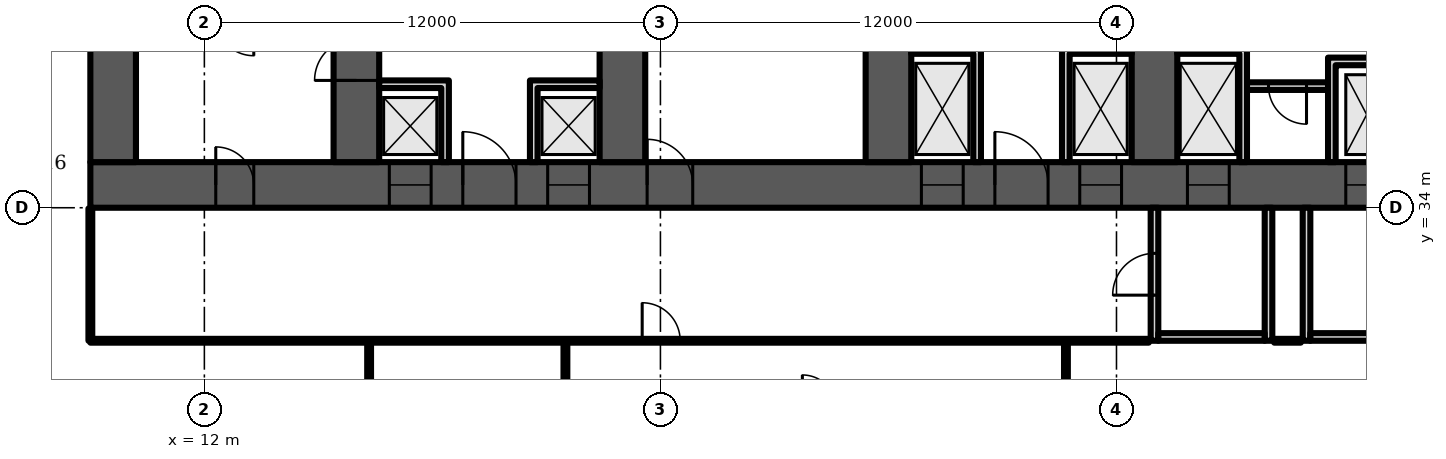
"""IFC4 building model, lengths in metres.
Left out: names, types, materials, properties, quantities, classifications, styles, units other than length and angle.
Written with IfcOpenShell. Run it as: python <this file> out.ifc"""

import sys

from ifc_helpers import new_model, si_unit, direction, frame, frame_2d, origin, place, context, subcontext, project, spatial, polyline, rectangle, outline, extrude, element, fill, save


model = new_model("IFC4")
c1 = context("Model", 3, precision=1e-05, world=origin(), true_north=direction((0.0, 1.0)))
c2 = subcontext(c1, "Body", "Model", "MODEL_VIEW")
j1 = project(units=[si_unit("LENGTHUNIT", "METRE"), si_unit("PLANEANGLEUNIT", "RADIAN")], contexts=[c1])
p1 = place(None, origin())
s1 = spatial("IfcSite", under=j1, at=p1, CompositionType="ELEMENT")
p2 = place(p1, origin())
s2 = spatial("IfcBuilding", under=s1, at=p2, CompositionType="ELEMENT")
p3 = place(p2, frame((0.0, 0.0, 84.7)))
s3 = spatial("IfcBuildingStorey", under=s2, at=p3, CompositionType="ELEMENT", Elevation=84.7)
p4 = place(p3, frame((9.0, 34.6, 0.0), z_axis=(0.0, 0.0, 1.0), x_axis=(1.0, 0.0, 0.0)))
e1 = element("IfcWall", 1, at=p4, inside=s3, PredefinedType="SHEAR", context=c2, shape_type="SweptSolid", body=[
    extrude(rectangle(XDim=56.0, YDim=1.2, at=frame_2d((28.0, 0.0))), origin(), (0.0, 0.0, 1.0), 3.6),
])
p5 = place(p4, frame((3.3, 0.0, 0.0)))
e2 = element("IfcOpeningElement", 2, at=p5, cuts=e1, PredefinedType="OPENING", context=c2, shape_type="SweptSolid", body=[
    extrude(rectangle(XDim=1.0, YDim=2.1, at=frame_2d((0.5, 1.05))), frame((0.0, 0.61, 0.0), z_axis=(0.0, -1.0, 0.0), x_axis=(1.0, 0.0, 0.0)), (0.0, 0.0, 1.0), 1.22),
])
p6 = place(p4, frame((7.867, 0.0, 0.0)))
e3 = element("IfcOpeningElement", 3, at=p6, cuts=e1, PredefinedType="OPENING", context=c2, shape_type="SweptSolid", body=[
    extrude(rectangle(XDim=1.1, YDim=2.1, at=frame_2d((0.55, 1.05))), frame((0.0, 0.61, 0.0), z_axis=(0.0, -1.0, 0.0), x_axis=(1.0, 0.0, 0.0)), (0.0, 0.0, 1.0), 1.22),
])
p7 = place(p4, frame((12.033, 0.0, 0.0)))
e4 = element("IfcOpeningElement", 4, at=p7, cuts=e1, PredefinedType="OPENING", context=c2, shape_type="SweptSolid", body=[
    extrude(rectangle(XDim=1.1, YDim=2.1, at=frame_2d((0.55, 1.05))), frame((0.0, 0.61, 0.0), z_axis=(0.0, -1.0, 0.0), x_axis=(1.0, 0.0, 0.0)), (0.0, 0.0, 1.0), 1.22),
])
p8 = place(p4, frame((9.8, 0.0, 0.0)))
e5 = element("IfcOpeningElement", 5, at=p8, cuts=e1, PredefinedType="OPENING", context=c2, shape_type="SweptSolid", body=[
    extrude(rectangle(XDim=1.4, YDim=2.1, at=frame_2d((0.7, 1.05))), frame((0.0, 0.61, 0.0), z_axis=(0.0, -1.0, 0.0), x_axis=(1.0, 0.0, 0.0)), (0.0, 0.0, 1.0), 1.22),
])
p9 = place(p4, frame((14.65, 0.0, 0.0)))
e6 = element("IfcOpeningElement", 6, at=p9, cuts=e1, PredefinedType="OPENING", context=c2, shape_type="SweptSolid", body=[
    extrude(rectangle(XDim=1.2, YDim=2.1, at=frame_2d((0.6, 1.05))), frame((0.0, 0.61, 0.0), z_axis=(0.0, -1.0, 0.0), x_axis=(1.0, 0.0, 0.0)), (0.0, 0.0, 1.0), 1.22),
])
p10 = place(p4, frame((21.867, 0.0, 0.0)))
e7 = element("IfcOpeningElement", 7, at=p10, cuts=e1, PredefinedType="OPENING", context=c2, shape_type="SweptSolid", body=[
    extrude(rectangle(XDim=1.1, YDim=2.1, at=frame_2d((0.55, 1.05))), frame((0.0, 0.61, 0.0), z_axis=(0.0, -1.0, 0.0), x_axis=(1.0, 0.0, 0.0)), (0.0, 0.0, 1.0), 1.22),
])
p11 = place(p4, frame((26.033, 0.0, 0.0)))
e8 = element("IfcOpeningElement", 8, at=p11, cuts=e1, PredefinedType="OPENING", context=c2, shape_type="SweptSolid", body=[
    extrude(rectangle(XDim=1.1, YDim=2.1, at=frame_2d((0.55, 1.05))), frame((0.0, 0.61, 0.0), z_axis=(0.0, -1.0, 0.0), x_axis=(1.0, 0.0, 0.0)), (0.0, 0.0, 1.0), 1.22),
])
p12 = place(p4, frame((23.8, 0.0, 0.0)))
e9 = element("IfcOpeningElement", 9, at=p12, cuts=e1, PredefinedType="OPENING", context=c2, shape_type="SweptSolid", body=[
    extrude(rectangle(XDim=1.4, YDim=2.1, at=frame_2d((0.7, 1.05))), frame((0.0, 0.61, 0.0), z_axis=(0.0, -1.0, 0.0), x_axis=(1.0, 0.0, 0.0)), (0.0, 0.0, 1.0), 1.22),
])
p13 = place(p4, frame((28.867, 0.0, 0.0)))
e10 = element("IfcOpeningElement", 10, at=p13, cuts=e1, PredefinedType="OPENING", context=c2, shape_type="SweptSolid", body=[
    extrude(rectangle(XDim=1.1, YDim=2.1, at=frame_2d((0.55, 1.05))), frame((0.0, 0.61, 0.0), z_axis=(0.0, -1.0, 0.0), x_axis=(1.0, 0.0, 0.0)), (0.0, 0.0, 1.0), 1.22),
])
p14 = place(p4, frame((33.033, 0.0, 0.0)))
e11 = element("IfcOpeningElement", 11, at=p14, cuts=e1, PredefinedType="OPENING", context=c2, shape_type="SweptSolid", body=[
    extrude(rectangle(XDim=1.1, YDim=2.1, at=frame_2d((0.55, 1.05))), frame((0.0, 0.61, 0.0), z_axis=(0.0, -1.0, 0.0), x_axis=(1.0, 0.0, 0.0)), (0.0, 0.0, 1.0), 1.22),
])
p15 = place(p4, frame((40.15, 0.0, 0.0)))
e12 = element("IfcOpeningElement", 12, at=p15, cuts=e1, PredefinedType="OPENING", context=c2, shape_type="SweptSolid", body=[
    extrude(rectangle(XDim=1.2, YDim=2.1, at=frame_2d((0.6, 1.05))), frame((0.0, 0.61, 0.0), z_axis=(0.0, -1.0, 0.0), x_axis=(1.0, 0.0, 0.0)), (0.0, 0.0, 1.0), 1.22),
])
p16 = place(p4, frame((44.8, 0.0, 0.0)))
e13 = element("IfcOpeningElement", 13, at=p16, cuts=e1, PredefinedType="OPENING", context=c2, shape_type="SweptSolid", body=[
    extrude(rectangle(XDim=1.4, YDim=2.1, at=frame_2d((0.7, 1.05))), frame((0.0, 0.61, 0.0), z_axis=(0.0, -1.0, 0.0), x_axis=(1.0, 0.0, 0.0)), (0.0, 0.0, 1.0), 1.22),
])
p17 = place(p4, frame((49.867, 0.0, 0.0)))
e14 = element("IfcOpeningElement", 14, at=p17, cuts=e1, PredefinedType="OPENING", context=c2, shape_type="SweptSolid", body=[
    extrude(rectangle(XDim=1.1, YDim=2.1, at=frame_2d((0.55, 1.05))), frame((0.0, 0.61, 0.0), z_axis=(0.0, -1.0, 0.0), x_axis=(1.0, 0.0, 0.0)), (0.0, 0.0, 1.0), 1.22),
])
p18 = place(p4, frame((53.5, 0.0, 0.0)))
e15 = element("IfcOpeningElement", 15, at=p18, cuts=e1, PredefinedType="OPENING", context=c2, shape_type="SweptSolid", body=[
    extrude(rectangle(XDim=1.1, YDim=2.1, at=frame_2d((0.55, 1.05))), frame((0.0, 0.61, 0.0), z_axis=(0.0, -1.0, 0.0), x_axis=(1.0, 0.0, 0.0)), (0.0, 0.0, 1.0), 1.22),
])
p19 = place(p4, frame((51.567, 0.0, 0.0)))
e16 = element("IfcOpeningElement", 16, at=p19, cuts=e1, PredefinedType="OPENING", context=c2, shape_type="SweptSolid", body=[
    extrude(rectangle(XDim=1.4, YDim=2.1, at=frame_2d((0.7, 1.05))), frame((0.0, 0.61, 0.0), z_axis=(0.0, -1.0, 0.0), x_axis=(1.0, 0.0, 0.0)), (0.0, 0.0, 1.0), 1.22),
])
p20 = place(p3, frame((9.6, 35.2, 0.0), z_axis=(0.0, 0.0, 1.0), x_axis=(0.0, 1.0, 0.0)))
e17 = element("IfcWall", 17, at=p20, inside=s3, PredefinedType="SHEAR", context=c2, shape_type="SweptSolid", body=[
    extrude(rectangle(XDim=12.383, YDim=1.2, at=frame_2d((6.191, 0.0))), origin(), (0.0, 0.0, 1.0), 3.6),
])
p21 = place(p3, frame((16.0, 35.2, 0.0), z_axis=(0.0, 0.0, 1.0), x_axis=(0.0, 1.0, 0.0)))
e18 = element("IfcWall", 18, at=p21, inside=s3, PredefinedType="SHEAR", context=c2, shape_type="SweptSolid", body=[
    extrude(rectangle(XDim=12.943, YDim=1.2, at=frame_2d((6.471, 0.0))), origin(), (0.0, 0.0, 1.0), 3.6),
])
p22 = place(p21, frame((2.15, 0.0, 0.0)))
e19 = element("IfcOpeningElement", 19, at=p22, cuts=e18, PredefinedType="OPENING", context=c2, shape_type="SweptSolid", body=[
    extrude(rectangle(XDim=1.1, YDim=2.1, at=frame_2d((0.55, 1.05))), frame((0.0, 0.61, 0.0), z_axis=(0.0, -1.0, 0.0), x_axis=(1.0, 0.0, 0.0)), (0.0, 0.0, 1.0), 1.22),
])
p23 = place(p21, frame((9.6, 0.0, 0.0)))
e20 = element("IfcOpeningElement", 20, at=p23, cuts=e18, PredefinedType="OPENING", context=c2, shape_type="SweptSolid", body=[
    extrude(rectangle(XDim=1.0, YDim=2.1, at=frame_2d((0.5, 1.05))), frame((0.0, 0.61, 0.0), z_axis=(0.0, -1.0, 0.0), x_axis=(1.0, 0.0, 0.0)), (0.0, 0.0, 1.0), 1.22),
])
p24 = place(p3, frame((23.0, 35.2, 0.0), z_axis=(0.0, 0.0, 1.0), x_axis=(0.0, 1.0, 0.0)))
e21 = element("IfcWall", 21, at=p24, inside=s3, PredefinedType="SHEAR", context=c2, shape_type="SweptSolid", body=[
    extrude(rectangle(XDim=13.555, YDim=1.2, at=frame_2d((6.778, 0.0))), origin(), (0.0, 0.0, 1.0), 3.6),
])
p25 = place(p24, frame((10.414, 0.0, 0.0)))
e22 = element("IfcOpeningElement", 22, at=p25, cuts=e21, PredefinedType="OPENING", context=c2, shape_type="SweptSolid", body=[
    extrude(rectangle(XDim=1.0, YDim=2.1, at=frame_2d((0.5, 1.05))), frame((0.0, 0.61, 0.0), z_axis=(0.0, -1.0, 0.0), x_axis=(1.0, 0.0, 0.0)), (0.0, 0.0, 1.0), 1.22),
])
p26 = place(p24, frame((3.2, 0.0, 0.0)))
e23 = element("IfcOpeningElement", 23, at=p26, cuts=e21, PredefinedType="OPENING", context=c2, shape_type="SweptSolid", body=[
    extrude(rectangle(XDim=1.1, YDim=2.1, at=frame_2d((0.55, 1.05))), frame((0.0, 0.61, 0.0), z_axis=(0.0, -1.0, 0.0), x_axis=(1.0, 0.0, 0.0)), (0.0, 0.0, 1.0), 1.22),
])
p27 = place(p3, frame((30.0, 35.2, 0.0), z_axis=(0.0, 0.0, 1.0), x_axis=(0.0, 1.0, 0.0)))
e24 = element("IfcWall", 24, at=p27, inside=s3, PredefinedType="SHEAR", context=c2, shape_type="SweptSolid", body=[
    extrude(rectangle(XDim=14.168, YDim=1.2, at=frame_2d((7.084, 0.0))), origin(), (0.0, 0.0, 1.0), 3.6),
])
p28 = place(p27, frame((3.2, 0.0, 0.0)))
e25 = element("IfcOpeningElement", 25, at=p28, cuts=e24, PredefinedType="OPENING", context=c2, shape_type="SweptSolid", body=[
    extrude(rectangle(XDim=1.1, YDim=2.1, at=frame_2d((0.55, 1.05))), frame((0.0, 0.61, 0.0), z_axis=(0.0, -1.0, 0.0), x_axis=(1.0, 0.0, 0.0)), (0.0, 0.0, 1.0), 1.22),
])
p29 = place(p3, frame((37.0, 35.2, 0.0), z_axis=(0.0, 0.0, 1.0), x_axis=(0.0, 1.0, 0.0)))
e26 = element("IfcWall", 26, at=p29, inside=s3, PredefinedType="SHEAR", context=c2, shape_type="SweptSolid", body=[
    extrude(rectangle(XDim=14.78, YDim=1.2, at=frame_2d((7.39, 0.0))), origin(), (0.0, 0.0, 1.0), 3.6),
])
p30 = place(p29, frame((3.2, 0.0, 0.0)))
e27 = element("IfcOpeningElement", 27, at=p30, cuts=e26, PredefinedType="OPENING", context=c2, shape_type="SweptSolid", body=[
    extrude(rectangle(XDim=1.1, YDim=2.1, at=frame_2d((0.55, 1.05))), frame((0.0, 0.61, 0.0), z_axis=(0.0, -1.0, 0.0), x_axis=(1.0, 0.0, 0.0)), (0.0, 0.0, 1.0), 1.22),
])
p31 = place(p29, frame((9.6, 0.0, 0.0)))
e28 = element("IfcOpeningElement", 28, at=p31, cuts=e26, PredefinedType="OPENING", context=c2, shape_type="SweptSolid", body=[
    extrude(rectangle(XDim=1.0, YDim=2.1, at=frame_2d((0.5, 1.05))), frame((0.0, 0.61, 0.0), z_axis=(0.0, -1.0, 0.0), x_axis=(1.0, 0.0, 0.0)), (0.0, 0.0, 1.0), 1.22),
])
p32 = place(p3, frame((0.0, 0.0, -0.0)))
e29 = element("IfcWall", 29, at=p32, inside=s3, PredefinedType="PARTITIONING", context=c2, shape_type="SweptSolid", body=[
    extrude(outline(polyline([(18.233, 37.15), (16.6, 37.15), (16.6, 37.35), (18.233, 37.35), (18.433, 37.35), (18.433, 35.2), (18.233, 35.2), (18.233, 37.15)])), origin(), (0.0, 0.0, 1.0), 3.2),
])
p33 = place(p3, frame((0.0, 0.0, -0.0)))
e30 = element("IfcWall", 30, at=p33, inside=s3, PredefinedType="PARTITIONING", context=c2, shape_type="SweptSolid", body=[
    extrude(outline(polyline([(20.567, 37.35), (20.767, 37.35), (22.4, 37.35), (22.4, 37.15), (20.767, 37.15), (20.767, 35.2), (20.567, 35.2), (20.567, 37.35)])), origin(), (0.0, 0.0, 1.0), 3.2),
])
p34 = place(p3, frame((0.0, 0.0, -0.0)))
e31 = element("IfcWall", 31, at=p34, inside=s3, PredefinedType="PARTITIONING", context=c2, shape_type="SweptSolid", body=[
    extrude(outline(polyline([(32.233, 38.05), (30.6, 38.05), (30.6, 38.25), (32.233, 38.25), (32.433, 38.25), (32.433, 35.2), (32.233, 35.2), (32.233, 38.05)])), origin(), (0.0, 0.0, 1.0), 3.2),
])
p35 = place(p3, frame((0.0, 0.0, -0.0)))
e32 = element("IfcWall", 32, at=p35, inside=s3, PredefinedType="PARTITIONING", context=c2, shape_type="SweptSolid", body=[
    extrude(outline(polyline([(34.567, 38.25), (34.767, 38.25), (36.4, 38.25), (36.4, 38.05), (34.767, 38.05), (34.767, 35.2), (34.567, 35.2), (34.567, 38.25)])), origin(), (0.0, 0.0, 1.0), 3.2),
])
p36 = place(p3, frame((39.433, 37.2, 0.0), z_axis=(0.0, 0.0, 1.0), x_axis=(1.0, 0.0, 0.0)))
e33 = element("IfcWall", 33, at=p36, inside=s3, PredefinedType="PARTITIONING", context=c2, shape_type="SweptSolid", body=[
    extrude(rectangle(XDim=2.133, YDim=0.2, at=frame_2d((1.067, 0.0))), origin(), (0.0, 0.0, 1.0), 3.2),
])
p37 = place(p36, frame((0.567, 0.0, 0.0)))
e34 = element("IfcOpeningElement", 34, at=p37, cuts=e33, PredefinedType="OPENING", context=c2, shape_type="SweptSolid", body=[
    extrude(rectangle(XDim=1.0, YDim=2.1, at=frame_2d((0.5, 1.05))), frame((0.0, 0.11, 0.0), z_axis=(0.0, -1.0, 0.0), x_axis=(1.0, 0.0, 0.0)), (0.0, 0.0, 1.0), 0.22),
])
p38 = place(p3, frame((0.0, 0.0, -0.0)))
e35 = element("IfcWall", 35, at=p38, inside=s3, PredefinedType="PARTITIONING", context=c2, shape_type="SweptSolid", body=[
    extrude(outline(polyline([(41.567, 37.95), (41.767, 37.95), (43.4, 37.95), (43.4, 37.75), (41.767, 37.75), (41.767, 35.2), (41.567, 35.2), (41.567, 37.95)])), origin(), (0.0, 0.0, 1.0), 3.2),
])
p39 = place(p3, frame((0.0, 0.0, -0.0)))
e36 = element("IfcWall", 36, at=p39, inside=s3, PredefinedType="PARTITIONING", context=c2, shape_type="SweptSolid", body=[
    extrude(outline(polyline([(39.233, 38.05), (37.6, 38.05), (37.6, 38.25), (39.233, 38.25), (39.433, 38.25), (39.433, 35.2), (39.233, 35.2), (39.233, 38.05)])), origin(), (0.0, 0.0, 1.0), 3.2),
])
p40 = place(p3, frame((37.0, 30.5, 0.0), z_axis=(0.0, 0.0, 1.0), x_axis=(0.0, 1.0, 0.0)))
e37 = element("IfcWall", 37, at=p40, inside=s3, PredefinedType="PARTITIONING", context=c2, shape_type="SweptSolid", body=[
    extrude(rectangle(XDim=3.5, YDim=0.2, at=frame_2d((1.75, 0.0))), origin(), (0.0, 0.0, 1.0), 3.2),
])
p41 = place(p40, frame((1.2, 0.0, 0.0)))
e38 = element("IfcOpeningElement", 38, at=p41, cuts=e37, PredefinedType="OPENING", context=c2, shape_type="SweptSolid", body=[
    extrude(rectangle(XDim=1.1, YDim=2.1, at=frame_2d((0.55, 1.05))), frame((0.0, 0.11, 0.0), z_axis=(0.0, -1.0, 0.0), x_axis=(1.0, 0.0, 0.0)), (0.0, 0.0, 1.0), 0.22),
])
p42 = place(p3, frame((40.0, 30.5, 0.0), z_axis=(0.0, 0.0, 1.0), x_axis=(0.0, 1.0, 0.0)))
e39 = element("IfcWall", 39, at=p42, inside=s3, PredefinedType="PARTITIONING", context=c2, shape_type="SweptSolid", body=[
    extrude(rectangle(XDim=3.5, YDim=0.2, at=frame_2d((1.75, 0.0))), origin(), (0.0, 0.0, 1.0), 3.2),
])
p43 = place(p3, frame((37.1, 30.6, 0.0), z_axis=(0.0, 0.0, 1.0), x_axis=(1.0, 0.0, 0.0)))
e40 = element("IfcWall", 40, at=p43, inside=s3, PredefinedType="PARTITIONING", context=c2, shape_type="SweptSolid", body=[
    extrude(rectangle(XDim=2.8, YDim=0.2, at=frame_2d((1.4, 0.0))), origin(), (0.0, 0.0, 1.0), 3.2),
])
p44 = place(p3, frame((41.0, 30.5, 0.0), z_axis=(0.0, 0.0, 1.0), x_axis=(0.0, 1.0, 0.0)))
e41 = element("IfcWall", 41, at=p44, inside=s3, PredefinedType="PARTITIONING", context=c2, shape_type="SweptSolid", body=[
    extrude(rectangle(XDim=3.5, YDim=0.2, at=frame_2d((1.75, 0.0))), origin(), (0.0, 0.0, 1.0), 3.2),
])
p45 = place(p3, frame((41.1, 30.6, 0.0), z_axis=(0.0, 0.0, 1.0), x_axis=(1.0, 0.0, 0.0)))
e42 = element("IfcWall", 42, at=p45, inside=s3, PredefinedType="PARTITIONING", context=c2, shape_type="SweptSolid", body=[
    extrude(rectangle(XDim=2.8, YDim=0.2, at=frame_2d((1.4, 0.0))), origin(), (0.0, 0.0, 1.0), 3.2),
])
p46 = place(p3, frame((9.0, 30.5, 0.0), z_axis=(0.0, 0.0, 1.0), x_axis=(0.0, 1.0, 0.0)))
e43 = element("IfcWall", 43, at=p46, inside=s3, PredefinedType="PARTITIONING", context=c2, shape_type="SweptSolid", body=[
    extrude(rectangle(XDim=3.48, YDim=0.1, at=frame_2d((1.74, 0.0))), origin(), (0.0, 0.0, 1.0), 3.2),
])
p47 = place(p3, frame((9.0, 30.5, 0.0), z_axis=(0.0, 0.0, 1.0), x_axis=(1.0, 0.0, 0.0)))
e44 = element("IfcWall", 44, at=p47, inside=s3, PredefinedType="PARTITIONING", context=c2, shape_type="SweptSolid", body=[
    extrude(rectangle(XDim=27.85, YDim=0.1, at=frame_2d((13.925, 0.0))), origin(), (0.0, 0.0, 1.0), 3.2),
])
p48 = place(p47, frame((14.52, 0.0, 0.0)))
e45 = element("IfcOpeningElement", 45, at=p48, cuts=e44, PredefinedType="OPENING", context=c2, shape_type="SweptSolid", body=[
    extrude(rectangle(XDim=1.0, YDim=2.1, at=frame_2d((0.5, 1.05))), frame((0.0, 0.06, 0.0), z_axis=(0.0, -1.0, 0.0), x_axis=(1.0, 0.0, 0.0)), (0.0, 0.0, 1.0), 0.12),
])
for number, where, z_axis, x_axis in (
    (46, (16.335, 14.93, 0.0), (0.0, 0.0, 1.0), (0.0, 1.0, 0.0)),
    (47, (21.5, 14.93, 0.0), (0.0, 0.0, 1.0), (0.0, 1.0, 0.0)),
):
    element("IfcWall", number, at=place(p3, frame(where, z_axis=z_axis, x_axis=x_axis)), inside=s3, PredefinedType="PARTITIONING", context=c2, shape_type="SweptSolid", body=[
        extrude(rectangle(XDim=15.57, YDim=0.1, at=frame_2d((7.785, 0.0))), origin(), (0.0, 0.0, 1.0), 3.2),
    ])
p49 = place(p3, frame((34.67, 14.93, 0.0), z_axis=(0.0, 0.0, 1.0), x_axis=(0.0, 1.0, 0.0)))
e48 = element("IfcWall", 48, at=p49, inside=s3, PredefinedType="PARTITIONING", context=c2, shape_type="SweptSolid", body=[
    extrude(rectangle(XDim=15.56, YDim=0.1, at=frame_2d((7.78, 0.0))), origin(), (0.0, 0.0, 1.0), 3.2),
])
p50 = place(p3, frame((40.15, 30.5, 0.0), z_axis=(0.0, 0.0, 1.0), x_axis=(1.0, 0.0, 0.0)))
e49 = element("IfcWall", 49, at=p50, inside=s3, PredefinedType="PARTITIONING", context=c2, shape_type="SweptSolid", body=[
    extrude(rectangle(XDim=0.7, YDim=0.1, at=frame_2d((0.35, 0.0))), origin(), (0.0, 0.0, 1.0), 3.2),
])
p51 = place(p5, origin())
e50 = element("IfcDoor", 50, at=p51, inside=s3, OperationType="SINGLE_SWING_LEFT", PredefinedType="DOOR", context=c2, shape_type="SweptSolid", body=[
    extrude(rectangle(XDim=1.0, YDim=2.1, at=frame_2d((0.5, 1.05))), frame((0.0, 0.6, 0.0), z_axis=(0.0, -1.0, 0.0), x_axis=(1.0, 0.0, 0.0)), (0.0, 0.0, 1.0), 1.199),
])
fill(e2, e50)
p52 = place(p6, origin())
e51 = element("IfcDoor", 51, at=p52, inside=s3, OperationType="DOUBLE_DOOR_SLIDING", PredefinedType="DOOR", context=c2, shape_type="SweptSolid", body=[
    extrude(rectangle(XDim=1.1, YDim=2.1, at=frame_2d((0.55, 1.05))), frame((0.0, 0.025, 0.0), z_axis=(0.0, -1.0, 0.0), x_axis=(1.0, 0.0, 0.0)), (0.0, 0.0, 1.0), 0.05),
])
fill(e3, e51)
p53 = place(p7, origin())
e52 = element("IfcDoor", 52, at=p53, inside=s3, OperationType="DOUBLE_DOOR_SLIDING", PredefinedType="DOOR", context=c2, shape_type="SweptSolid", body=[
    extrude(rectangle(XDim=1.1, YDim=2.1, at=frame_2d((0.55, 1.05))), frame((0.0, 0.025, 0.0), z_axis=(0.0, -1.0, 0.0), x_axis=(1.0, 0.0, 0.0)), (0.0, 0.0, 1.0), 0.05),
])
fill(e4, e52)
p54 = place(p8, origin())
e53 = element("IfcDoor", 53, at=p54, inside=s3, OperationType="DOUBLE_DOOR_SINGLE_SWING", PredefinedType="DOOR", context=c2, shape_type="SweptSolid", body=[
    extrude(rectangle(XDim=1.4, YDim=2.1, at=frame_2d((0.7, 1.05))), frame((0.0, 0.025, 0.0), z_axis=(0.0, -1.0, 0.0), x_axis=(1.0, 0.0, 0.0)), (0.0, 0.0, 1.0), 0.05),
])
fill(e5, e53)
p55 = place(p9, origin())
e54 = element("IfcDoor", 54, at=p55, inside=s3, OperationType="SINGLE_SWING_LEFT", PredefinedType="DOOR", context=c2, shape_type="SweptSolid", body=[
    extrude(rectangle(XDim=1.2, YDim=2.1, at=frame_2d((0.6, 1.05))), frame((0.0, 0.025, 0.0), z_axis=(0.0, -1.0, 0.0), x_axis=(1.0, 0.0, 0.0)), (0.0, 0.0, 1.0), 0.05),
])
fill(e6, e54)
p56 = place(p10, origin())
e55 = element("IfcDoor", 55, at=p56, inside=s3, OperationType="DOUBLE_DOOR_SLIDING", PredefinedType="DOOR", context=c2, shape_type="SweptSolid", body=[
    extrude(rectangle(XDim=1.1, YDim=2.1, at=frame_2d((0.55, 1.05))), frame((0.0, 0.025, 0.0), z_axis=(0.0, -1.0, 0.0), x_axis=(1.0, 0.0, 0.0)), (0.0, 0.0, 1.0), 0.05),
])
fill(e7, e55)
p57 = place(p11, origin())
e56 = element("IfcDoor", 56, at=p57, inside=s3, OperationType="DOUBLE_DOOR_SLIDING", PredefinedType="DOOR", context=c2, shape_type="SweptSolid", body=[
    extrude(rectangle(XDim=1.1, YDim=2.1, at=frame_2d((0.55, 1.05))), frame((0.0, 0.025, 0.0), z_axis=(0.0, -1.0, 0.0), x_axis=(1.0, 0.0, 0.0)), (0.0, 0.0, 1.0), 0.05),
])
fill(e8, e56)
p58 = place(p12, origin())
e57 = element("IfcDoor", 57, at=p58, inside=s3, OperationType="DOUBLE_DOOR_SINGLE_SWING", PredefinedType="DOOR", context=c2, shape_type="SweptSolid", body=[
    extrude(rectangle(XDim=1.4, YDim=2.1, at=frame_2d((0.7, 1.05))), frame((0.0, 0.025, 0.0), z_axis=(0.0, -1.0, 0.0), x_axis=(1.0, 0.0, 0.0)), (0.0, 0.0, 1.0), 0.05),
])
fill(e9, e57)
p59 = place(p37, origin())
e58 = element("IfcDoor", 58, at=p59, inside=s3, OperationType="SINGLE_SWING_RIGHT", PredefinedType="DOOR", context=c2, shape_type="SweptSolid", body=[
    extrude(rectangle(XDim=1.0, YDim=2.1, at=frame_2d((0.5, 1.05))), frame((0.0, 0.025, 0.0), z_axis=(0.0, -1.0, 0.0), x_axis=(1.0, 0.0, 0.0)), (0.0, 0.0, 1.0), 0.05),
])
fill(e34, e58)
p60 = place(p13, origin())
e59 = element("IfcDoor", 59, at=p60, inside=s3, OperationType="DOUBLE_DOOR_SLIDING", PredefinedType="DOOR", context=c2, shape_type="SweptSolid", body=[
    extrude(rectangle(XDim=1.1, YDim=2.1, at=frame_2d((0.55, 1.05))), frame((0.0, 0.025, 0.0), z_axis=(0.0, -1.0, 0.0), x_axis=(1.0, 0.0, 0.0)), (0.0, 0.0, 1.0), 0.05),
])
fill(e10, e59)
p61 = place(p14, origin())
e60 = element("IfcDoor", 60, at=p61, inside=s3, OperationType="DOUBLE_DOOR_SLIDING", PredefinedType="DOOR", context=c2, shape_type="SweptSolid", body=[
    extrude(rectangle(XDim=1.1, YDim=2.1, at=frame_2d((0.55, 1.05))), frame((0.0, 0.025, 0.0), z_axis=(0.0, -1.0, 0.0), x_axis=(1.0, 0.0, 0.0)), (0.0, 0.0, 1.0), 0.05),
])
fill(e11, e60)
p62 = place(p22, origin())
e61 = element("IfcDoor", 61, at=p62, inside=s3, OperationType="SINGLE_SWING_LEFT", PredefinedType="DOOR", context=c2, shape_type="SweptSolid", body=[
    extrude(rectangle(XDim=1.1, YDim=2.1, at=frame_2d((0.55, 1.05))), frame((0.0, 0.025, 0.0), z_axis=(0.0, -1.0, 0.0), x_axis=(1.0, 0.0, 0.0)), (0.0, 0.0, 1.0), 0.05),
])
fill(e19, e61)
p63 = place(p41, origin())
e62 = element("IfcDoor", 62, at=p63, inside=s3, OperationType="SINGLE_SWING_LEFT", PredefinedType="DOOR", context=c2, shape_type="SweptSolid", body=[
    extrude(rectangle(XDim=1.1, YDim=2.1, at=frame_2d((0.55, 1.05))), frame((0.0, 0.025, 0.0), z_axis=(0.0, -1.0, 0.0), x_axis=(1.0, 0.0, 0.0)), (0.0, 0.0, 1.0), 0.05),
])
fill(e38, e62)
p64 = place(p48, origin())
e63 = element("IfcDoor", 63, at=p64, inside=s3, OperationType="SINGLE_SWING_LEFT", PredefinedType="DOOR", context=c2, shape_type="SweptSolid", body=[
    extrude(rectangle(XDim=1.0, YDim=2.1, at=frame_2d((0.5, 1.05))), frame((0.0, 0.025, 0.0), z_axis=(0.0, -1.0, 0.0), x_axis=(1.0, 0.0, 0.0)), (0.0, 0.0, 1.0), 0.05),
])
fill(e45, e63)
save(model, sys.argv[1])
